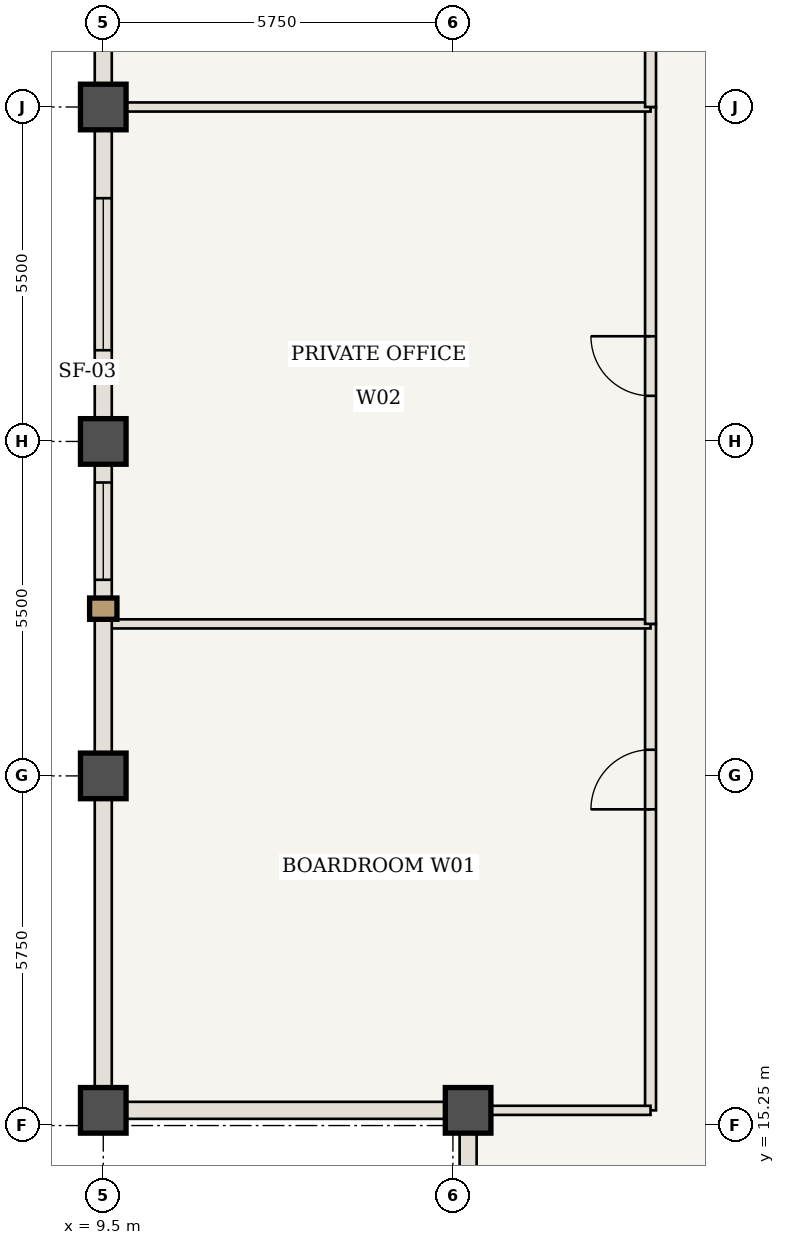
"""IFC4 building model, lengths in metres.
Left out: names, types, materials, properties, quantities, classifications, styles, units other than length and angle.
Written with IfcOpenShell. Run it as: python <this file> out.ifc"""

import sys

from ifc_helpers import new_model, si_unit, direction, frame, frame_2d, origin, origin_2d, place, context, subcontext, project, spatial, rectangle, extrude, element, fill, save


model = new_model("IFC4")
c1 = context("Model", 3, precision=1e-05, world=origin(), true_north=direction((0.0, 1.0)))
c2 = subcontext(c1, "Body", "Model", "MODEL_VIEW")
j1 = project(units=[si_unit("LENGTHUNIT", "METRE"), si_unit("PLANEANGLEUNIT", "RADIAN")], contexts=[c1])
p1 = place(None, origin())
s1 = spatial("IfcSite", under=j1, at=p1, CompositionType="ELEMENT")
p2 = place(p1, origin())
s2 = spatial("IfcBuilding", under=s1, at=p2, CompositionType="ELEMENT")
p3 = place(p2, frame((0.0, 0.0, 262.15)))
s3 = spatial("IfcBuildingStorey", under=s2, at=p3, CompositionType="ELEMENT", Elevation=262.15)
for number, where, z_axis, x_axis in (
    (1, (15.5, 15.5, 0.0), (0.0, 0.0, 1.0), (1.0, 0.0, 0.0)),
    (2, (9.5, 15.5, 0.0), (0.0, 0.0, 1.0), (1.0, 0.0, 0.0)),
    (3, (9.5, 21.0, 0.0), (0.0, 0.0, 1.0), (1.0, 0.0, 0.0)),
    (4, (9.5, 26.5, 0.0), (0.0, 0.0, 1.0), (1.0, 0.0, 0.0)),
    (5, (9.5, 32.0, 0.0), (0.0, 0.0, 1.0), (1.0, 0.0, 0.0)),
):
    element("IfcColumn", number, at=place(p3, frame(where, z_axis=z_axis, x_axis=x_axis)), inside=s3, PredefinedType="COLUMN", context=c2, shape_type="SweptSolid", body=[
        extrude(rectangle(XDim=0.75, YDim=0.75, at=origin_2d()), origin(), (0.0, 0.0, 1.0), 3.85),
    ])
p4 = place(p3, frame((18.5, 15.5, 0.0), z_axis=(0.0, 0.0, 1.0), x_axis=(0.0, 1.0, 0.0)))
e6 = element("IfcWall", 6, at=p4, inside=s3, PredefinedType="STANDARD", context=c2, shape_type="SweptSolid", body=[
    extrude(rectangle(XDim=8.0, YDim=0.18, at=frame_2d((4.0, 0.0))), origin(), (0.0, 0.0, 1.0), 3.43),
])
p5 = place(p4, frame((4.95, 0.0, 0.0)))
e7 = element("IfcOpeningElement", 7, at=p5, cuts=e6, PredefinedType="OPENING", context=c2, shape_type="SweptSolid", body=[
    extrude(rectangle(XDim=0.98, YDim=2.2, at=frame_2d((0.49, 1.1))), frame((0.0, 0.1, 0.0), z_axis=(0.0, -1.0, 0.0), x_axis=(1.0, 0.0, 0.0)), (0.0, 0.0, 1.0), 0.2),
])
p6 = place(p3, frame((9.56, 23.5, 0.0), z_axis=(0.0, 0.0, 1.0), x_axis=(1.0, 0.0, 0.0)))
e8 = element("IfcWall", 8, at=p6, inside=s3, PredefinedType="STANDARD", context=c2, shape_type="SweptSolid", body=[
    extrude(rectangle(XDim=8.94, YDim=0.15, at=frame_2d((4.47, 0.0))), origin(), (0.0, 0.0, 1.0), 3.43),
])
p7 = place(p3, frame((18.5, 23.5, 0.0), z_axis=(0.0, 0.0, 1.0), x_axis=(0.0, 1.0, 0.0)))
e9 = element("IfcWall", 9, at=p7, inside=s3, PredefinedType="STANDARD", context=c2, shape_type="SweptSolid", body=[
    extrude(rectangle(XDim=8.5, YDim=0.18, at=frame_2d((4.25, 0.0))), origin(), (0.0, 0.0, 1.0), 3.43),
])
p8 = place(p7, frame((3.75, 0.0, 0.0)))
e10 = element("IfcOpeningElement", 10, at=p8, cuts=e9, PredefinedType="OPENING", context=c2, shape_type="SweptSolid", body=[
    extrude(rectangle(XDim=0.98, YDim=2.2, at=frame_2d((0.49, 1.1))), frame((0.0, 0.1, 0.0), z_axis=(0.0, -1.0, 0.0), x_axis=(1.0, 0.0, 0.0)), (0.0, 0.0, 1.0), 0.2),
])
p9 = place(p3, frame((9.56, 32.0, 0.0), z_axis=(0.0, 0.0, 1.0), x_axis=(1.0, 0.0, 0.0)))
e11 = element("IfcWall", 11, at=p9, inside=s3, PredefinedType="STANDARD", context=c2, shape_type="SweptSolid", body=[
    extrude(rectangle(XDim=8.94, YDim=0.15, at=frame_2d((4.47, 0.0))), origin(), (0.0, 0.0, 1.0), 2.885),
])
p10 = place(p3, frame((18.5, 32.0, 0.0), z_axis=(0.0, 0.0, 1.0), x_axis=(0.0, 1.0, 0.0)))
e12 = element("IfcWall", 12, at=p10, inside=s3, PredefinedType="STANDARD", context=c2, shape_type="SweptSolid", body=[
    extrude(rectangle(XDim=8.5, YDim=0.18, at=frame_2d((4.25, 0.0))), origin(), (0.0, 0.0, 1.0), 3.43),
])
p11 = place(p10, frame((3.75, 0.0, 0.0)))
e13 = element("IfcOpeningElement", 13, at=p11, cuts=e12, PredefinedType="OPENING", context=c2, shape_type="SweptSolid", body=[
    extrude(rectangle(XDim=0.98, YDim=2.2, at=frame_2d((0.49, 1.1))), frame((0.0, 0.1, 0.0), z_axis=(0.0, -1.0, 0.0), x_axis=(1.0, 0.0, 0.0)), (0.0, 0.0, 1.0), 0.2),
])
p12 = place(p3, frame((15.5, 15.5, 0.0), z_axis=(0.0, 0.0, 1.0), x_axis=(1.0, 0.0, 0.0)))
e14 = element("IfcWall", 14, at=p12, inside=s3, PredefinedType="STANDARD", context=c2, shape_type="SweptSolid", body=[
    extrude(rectangle(XDim=3.0, YDim=0.15, at=frame_2d((1.5, 0.0))), origin(), (0.0, 0.0, 1.0), 3.43),
])
p13 = place(p3, frame((9.5, 15.5, 0.0), z_axis=(0.0, 0.0, 1.0), x_axis=(0.0, 1.0, 0.0)))
e15 = element("IfcWall", 15, at=p13, inside=s3, PredefinedType="USERDEFINED", context=c2, shape_type="SweptSolid", body=[
    extrude(rectangle(XDim=5.5, YDim=0.28, at=frame_2d((2.75, 0.0))), origin(), (0.0, 0.0, 1.0), 2.73),
])
p14 = place(p3, frame((9.5, 21.0, 0.0), z_axis=(0.0, 0.0, 1.0), x_axis=(0.0, 1.0, 0.0)))
e16 = element("IfcWall", 16, at=p14, inside=s3, PredefinedType="USERDEFINED", context=c2, shape_type="SweptSolid", body=[
    extrude(rectangle(XDim=5.5, YDim=0.28, at=frame_2d((2.75, 0.0))), origin(), (0.0, 0.0, 1.0), 2.73),
])
p15 = place(p14, frame((3.225, 0.0, 0.85)))
e17 = element("IfcOpeningElement", 17, at=p15, cuts=e16, PredefinedType="OPENING", context=c2, shape_type="SweptSolid", body=[
    extrude(rectangle(XDim=1.6, YDim=1.68, at=frame_2d((0.8, 0.84))), frame((0.0, 0.15, 0.0), z_axis=(0.0, -1.0, 0.0), x_axis=(1.0, 0.0, 0.0)), (0.0, 0.0, 1.0), 0.3),
])
p16 = place(p3, frame((9.5, 26.5, 0.0), z_axis=(0.0, 0.0, 1.0), x_axis=(0.0, 1.0, 0.0)))
e18 = element("IfcWall", 18, at=p16, inside=s3, PredefinedType="USERDEFINED", context=c2, shape_type="SweptSolid", body=[
    extrude(rectangle(XDim=5.5, YDim=0.28, at=frame_2d((2.75, 0.0))), origin(), (0.0, 0.0, 1.0), 2.73),
])
p17 = place(p16, frame((1.5, 0.0, 0.85)))
e19 = element("IfcOpeningElement", 19, at=p17, cuts=e18, PredefinedType="OPENING", context=c2, shape_type="SweptSolid", body=[
    extrude(rectangle(XDim=2.5, YDim=1.68, at=frame_2d((1.25, 0.84))), frame((0.0, 0.15, 0.0), z_axis=(0.0, -1.0, 0.0), x_axis=(1.0, 0.0, 0.0)), (0.0, 0.0, 1.0), 0.3),
])
p18 = place(p3, frame((9.5, 32.0, 0.0), z_axis=(0.0, 0.0, 1.0), x_axis=(0.0, 1.0, 0.0)))
e20 = element("IfcWall", 20, at=p18, inside=s3, PredefinedType="USERDEFINED", context=c2, shape_type="SweptSolid", body=[
    extrude(rectangle(XDim=5.5, YDim=0.28, at=frame_2d((2.75, 0.0))), origin(), (0.0, 0.0, 1.0), 2.73),
])
p19 = place(p18, frame((1.5, 0.0, 0.85)))
e21 = element("IfcOpeningElement", 21, at=p19, cuts=e20, PredefinedType="OPENING", context=c2, shape_type="SweptSolid", body=[
    extrude(rectangle(XDim=2.5, YDim=1.68, at=frame_2d((1.25, 0.84))), frame((0.0, 0.15, 0.0), z_axis=(0.0, -1.0, 0.0), x_axis=(1.0, 0.0, 0.0)), (0.0, 0.0, 1.0), 0.3),
])
for number, where, z_axis, x_axis in (
    (22, (15.5, 9.5, 0.0), (0.0, 0.0, 1.0), (0.0, 1.0, 0.0)),
    (23, (15.5, 15.5, 0.0), (0.0, 0.0, 1.0), (-1.0, 0.0, 0.0)),
):
    element("IfcWall", number, at=place(p3, frame(where, z_axis=z_axis, x_axis=x_axis)), inside=s3, PredefinedType="USERDEFINED", context=c2, shape_type="SweptSolid", body=[
        extrude(rectangle(XDim=6.0, YDim=0.28, at=frame_2d((3.0, 0.0))), origin(), (0.0, 0.0, 1.0), 2.73),
    ])
p20 = place(p5, origin())
e24 = element("IfcDoor", 24, at=p20, inside=s3, OperationType="SINGLE_SWING_LEFT", PredefinedType="DOOR", context=c2, shape_type="SweptSolid", body=[
    extrude(rectangle(XDim=0.98, YDim=2.2, at=frame_2d((0.49, 1.1))), frame((0.0, 0.025, 0.0), z_axis=(0.0, -1.0, 0.0), x_axis=(1.0, 0.0, 0.0)), (0.0, 0.0, 1.0), 0.05),
])
fill(e7, e24)
p21 = place(p8, origin())
e25 = element("IfcDoor", 25, at=p21, inside=s3, OperationType="SINGLE_SWING_RIGHT", PredefinedType="DOOR", context=c2, shape_type="SweptSolid", body=[
    extrude(rectangle(XDim=0.98, YDim=2.2, at=frame_2d((0.49, 1.1))), frame((0.0, 0.025, 0.0), z_axis=(0.0, -1.0, 0.0), x_axis=(1.0, 0.0, 0.0)), (0.0, 0.0, 1.0), 0.05),
])
fill(e10, e25)
p22 = place(p15, origin())
e26 = element("IfcWindow", 26, at=p22, inside=s3, PartitioningType="SINGLE_PANEL", PredefinedType="WINDOW", context=c2, shape_type="SweptSolid", body=[
    extrude(rectangle(XDim=1.6, YDim=1.68, at=frame_2d((0.8, 0.84))), frame((0.0, 0.03, 0.0), z_axis=(0.0, -1.0, 0.0), x_axis=(1.0, 0.0, 0.0)), (0.0, 0.0, 1.0), 0.06),
])
fill(e17, e26)
p23 = place(p17, origin())
e27 = element("IfcWindow", 27, at=p23, inside=s3, PartitioningType="SINGLE_PANEL", PredefinedType="WINDOW", context=c2, shape_type="SweptSolid", body=[
    extrude(rectangle(XDim=2.5, YDim=1.68, at=frame_2d((1.25, 0.84))), frame((0.0, 0.03, 0.0), z_axis=(0.0, -1.0, 0.0), x_axis=(1.0, 0.0, 0.0)), (0.0, 0.0, 1.0), 0.06),
])
fill(e19, e27)
save(model, sys.argv[1])
